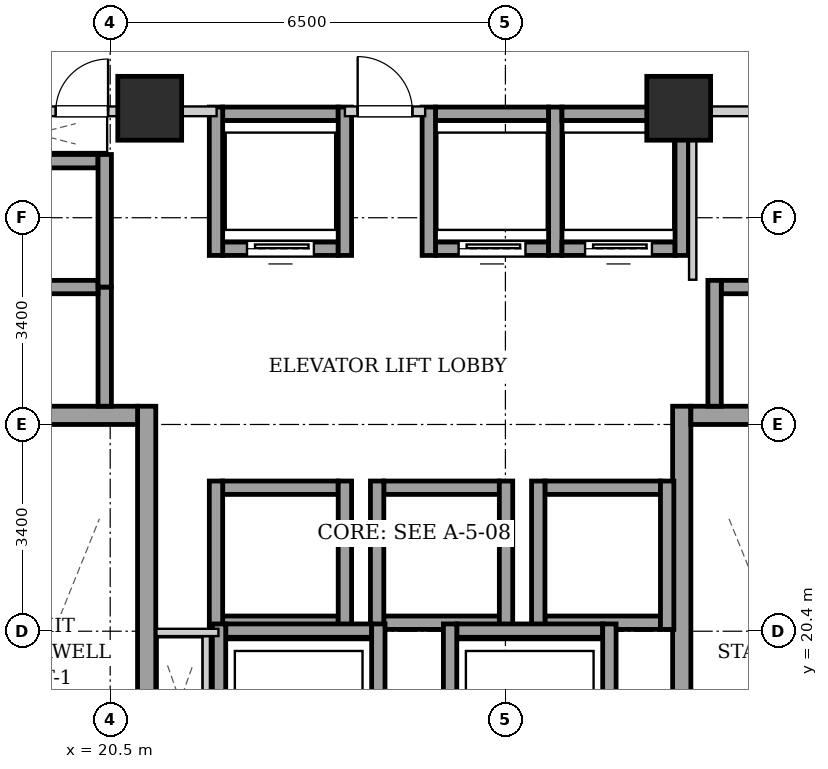
"""IFC4 building model, lengths in metres.
Left out: names, types, materials, properties, quantities, classifications, styles, units other than length and angle.
Written with IfcOpenShell. Run it as: python <this file> out.ifc"""

import sys

from ifc_helpers import new_model, si_unit, direction, frame, frame_2d, origin, origin_2d, place, context, subcontext, project, spatial, rectangle, extrude, element, fill, save


model = new_model("IFC4")
c1 = context("Model", 3, precision=1e-05, world=origin(), true_north=direction((0.0, 1.0)))
c2 = subcontext(c1, "Body", "Model", "MODEL_VIEW")
j1 = project(units=[si_unit("LENGTHUNIT", "METRE"), si_unit("PLANEANGLEUNIT", "RADIAN")], contexts=[c1])
p1 = place(None, origin())
s1 = spatial("IfcSite", under=j1, at=p1, CompositionType="ELEMENT")
p2 = place(p1, origin())
s2 = spatial("IfcBuilding", under=s1, at=p2, CompositionType="ELEMENT")
p3 = place(p2, frame((0.0, 0.0, 84.7)))
s3 = spatial("IfcBuildingStorey", under=s2, at=p3, CompositionType="ELEMENT", Elevation=84.7)
for number, where, z_axis, x_axis in (
    (1, (21.15, 29.0, 0.0), (0.0, 0.0, 1.0), (1.0, 0.0, 0.0)),
    (2, (29.85, 29.0, 0.0), (0.0, 0.0, 1.0), (1.0, 0.0, 0.0)),
):
    element("IfcColumn", number, at=place(p3, frame(where, z_axis=z_axis, x_axis=x_axis)), inside=s3, PredefinedType="COLUMN", context=c2, shape_type="SweptSolid", body=[
        extrude(rectangle(XDim=1.05, YDim=1.05, at=origin_2d()), origin(), (0.0, 0.0, 1.0), 3.2),
    ])
p4 = place(p3, frame((21.1, 15.1, 0.0), z_axis=(0.0, 0.0, 1.0), x_axis=(0.0, 1.0, 0.0)))
e3 = element("IfcWall", 3, at=p4, inside=s3, PredefinedType="SHEAR", context=c2, shape_type="SweptSolid", body=[
    extrude(rectangle(XDim=9.0, YDim=0.3, at=frame_2d((4.5, 0.0))), origin(), (0.0, 0.0, 1.0), 2.94),
])
p5 = place(p3, frame((18.1, 23.95, 0.0), z_axis=(0.0, 0.0, 1.0), x_axis=(1.0, 0.0, 0.0)))
e4 = element("IfcWall", 4, at=p5, inside=s3, PredefinedType="SHEAR", context=c2, shape_type="SweptSolid", body=[
    extrude(rectangle(XDim=2.85, YDim=0.3, at=frame_2d((1.425, 0.0))), origin(), (0.0, 0.0, 1.0), 2.94),
])
p6 = place(p3, frame((29.9, 15.1, 0.0), z_axis=(0.0, 0.0, 1.0), x_axis=(0.0, 1.0, 0.0)))
e5 = element("IfcWall", 5, at=p6, inside=s3, PredefinedType="SHEAR", context=c2, shape_type="SweptSolid", body=[
    extrude(rectangle(XDim=9.0, YDim=0.3, at=frame_2d((4.5, 0.0))), origin(), (0.0, 0.0, 1.0), 2.94),
])
p7 = place(p3, frame((30.05, 23.95, 0.0), z_axis=(0.0, 0.0, 1.0), x_axis=(1.0, 0.0, 0.0)))
e6 = element("IfcWall", 6, at=p7, inside=s3, PredefinedType="SHEAR", context=c2, shape_type="SweptSolid", body=[
    extrude(rectangle(XDim=2.85, YDim=0.3, at=frame_2d((1.425, 0.0))), origin(), (0.0, 0.0, 1.0), 2.94),
])
p8 = place(p3, frame((22.35, 26.69, 0.0), z_axis=(0.0, 0.0, 1.0), x_axis=(1.0, 0.0, 0.0)))
e7 = element("IfcWall", 7, at=p8, inside=s3, PredefinedType="SHEAR", context=c2, shape_type="SweptSolid", body=[
    extrude(rectangle(XDim=1.9, YDim=0.22, at=frame_2d((0.95, 0.0))), origin(), (0.0, 0.0, 1.0), 2.94),
])
p9 = place(p8, frame((0.4, 0.0, 0.0)))
e8 = element("IfcOpeningElement", 8, at=p9, cuts=e7, PredefinedType="OPENING", context=c2, shape_type="SweptSolid", body=[
    extrude(rectangle(XDim=1.1, YDim=2.15, at=frame_2d((0.55, 1.075))), frame((0.0, 0.12, 0.0), z_axis=(0.0, -1.0, 0.0), x_axis=(1.0, 0.0, 0.0)), (0.0, 0.0, 1.0), 0.24),
])
p10 = place(p3, frame((22.35, 28.91, 0.0), z_axis=(0.0, 0.0, 1.0), x_axis=(1.0, 0.0, 0.0)))
e9 = element("IfcWall", 9, at=p10, inside=s3, PredefinedType="SHEAR", context=c2, shape_type="SweptSolid", body=[
    extrude(rectangle(XDim=1.9, YDim=0.22, at=frame_2d((0.95, 0.0))), origin(), (0.0, 0.0, 1.0), 2.94),
])
for number, where, z_axis, x_axis in (
    (10, (22.24, 26.58, 0.0), (0.0, 0.0, 1.0), (0.0, 1.0, 0.0)),
    (11, (24.36, 26.58, 0.0), (0.0, 0.0, 1.0), (0.0, 1.0, 0.0)),
):
    element("IfcWall", number, at=place(p3, frame(where, z_axis=z_axis, x_axis=x_axis)), inside=s3, PredefinedType="SHEAR", context=c2, shape_type="SweptSolid", body=[
        extrude(rectangle(XDim=2.44, YDim=0.22, at=frame_2d((1.22, 0.0))), origin(), (0.0, 0.0, 1.0), 2.94),
    ])
p11 = place(p3, frame((25.85, 26.69, 0.0), z_axis=(0.0, 0.0, 1.0), x_axis=(1.0, 0.0, 0.0)))
e12 = element("IfcWall", 12, at=p11, inside=s3, PredefinedType="SHEAR", context=c2, shape_type="SweptSolid", body=[
    extrude(rectangle(XDim=1.86, YDim=0.22, at=frame_2d((0.93, 0.0))), origin(), (0.0, 0.0, 1.0), 2.94),
])
p12 = place(p11, frame((0.38, 0.0, 0.0)))
e13 = element("IfcOpeningElement", 13, at=p12, cuts=e12, PredefinedType="OPENING", context=c2, shape_type="SweptSolid", body=[
    extrude(rectangle(XDim=1.1, YDim=2.15, at=frame_2d((0.55, 1.075))), frame((0.0, 0.12, 0.0), z_axis=(0.0, -1.0, 0.0), x_axis=(1.0, 0.0, 0.0)), (0.0, 0.0, 1.0), 0.24),
])
p13 = place(p3, frame((25.85, 28.91, 0.0), z_axis=(0.0, 0.0, 1.0), x_axis=(1.0, 0.0, 0.0)))
e14 = element("IfcWall", 14, at=p13, inside=s3, PredefinedType="SHEAR", context=c2, shape_type="SweptSolid", body=[
    extrude(rectangle(XDim=1.86, YDim=0.22, at=frame_2d((0.93, 0.0))), origin(), (0.0, 0.0, 1.0), 2.94),
])
for number, where, z_axis, x_axis in (
    (15, (25.74, 26.58, 0.0), (0.0, 0.0, 1.0), (0.0, 1.0, 0.0)),
    (16, (27.82, 26.58, 0.0), (0.0, 0.0, 1.0), (0.0, 1.0, 0.0)),
):
    element("IfcWall", number, at=place(p3, frame(where, z_axis=z_axis, x_axis=x_axis)), inside=s3, PredefinedType="SHEAR", context=c2, shape_type="SweptSolid", body=[
        extrude(rectangle(XDim=2.44, YDim=0.22, at=frame_2d((1.22, 0.0))), origin(), (0.0, 0.0, 1.0), 2.94),
    ])
p14 = place(p3, frame((27.93, 26.69, 0.0), z_axis=(0.0, 0.0, 1.0), x_axis=(1.0, 0.0, 0.0)))
e17 = element("IfcWall", 17, at=p14, inside=s3, PredefinedType="SHEAR", context=c2, shape_type="SweptSolid", body=[
    extrude(rectangle(XDim=1.86, YDim=0.22, at=frame_2d((0.93, 0.0))), origin(), (0.0, 0.0, 1.0), 2.94),
])
p15 = place(p14, frame((0.38, 0.0, 0.0)))
e18 = element("IfcOpeningElement", 18, at=p15, cuts=e17, PredefinedType="OPENING", context=c2, shape_type="SweptSolid", body=[
    extrude(rectangle(XDim=1.1, YDim=2.15, at=frame_2d((0.55, 1.075))), frame((0.0, 0.12, 0.0), z_axis=(0.0, -1.0, 0.0), x_axis=(1.0, 0.0, 0.0)), (0.0, 0.0, 1.0), 0.24),
])
p16 = place(p3, frame((27.93, 28.91, 0.0), z_axis=(0.0, 0.0, 1.0), x_axis=(1.0, 0.0, 0.0)))
e19 = element("IfcWall", 19, at=p16, inside=s3, PredefinedType="SHEAR", context=c2, shape_type="SweptSolid", body=[
    extrude(rectangle(XDim=1.86, YDim=0.22, at=frame_2d((0.93, 0.0))), origin(), (0.0, 0.0, 1.0), 2.94),
])
p17 = place(p3, frame((29.9, 26.58, 0.0), z_axis=(0.0, 0.0, 1.0), x_axis=(0.0, 1.0, 0.0)))
e20 = element("IfcWall", 20, at=p17, inside=s3, PredefinedType="SHEAR", context=c2, shape_type="SweptSolid", body=[
    extrude(rectangle(XDim=2.44, YDim=0.22, at=frame_2d((1.22, 0.0))), origin(), (0.0, 0.0, 1.0), 2.94),
])
for number, where, z_axis, x_axis in (
    (21, (22.35, 20.54, 0.0), (0.0, 0.0, 1.0), (1.0, 0.0, 0.0)),
    (22, (22.35, 22.76, 0.0), (0.0, 0.0, 1.0), (1.0, 0.0, 0.0)),
):
    element("IfcWall", number, at=place(p3, frame(where, z_axis=z_axis, x_axis=x_axis)), inside=s3, PredefinedType="SHEAR", context=c2, shape_type="SweptSolid", body=[
        extrude(rectangle(XDim=1.9, YDim=0.22, at=frame_2d((0.95, 0.0))), origin(), (0.0, 0.0, 1.0), 2.94),
    ])
for number, where, z_axis, x_axis in (
    (23, (22.24, 20.43, 0.0), (0.0, 0.0, 1.0), (0.0, 1.0, 0.0)),
    (24, (24.36, 20.43, 0.0), (0.0, 0.0, 1.0), (0.0, 1.0, 0.0)),
):
    element("IfcWall", number, at=place(p3, frame(where, z_axis=z_axis, x_axis=x_axis)), inside=s3, PredefinedType="SHEAR", context=c2, shape_type="SweptSolid", body=[
        extrude(rectangle(XDim=2.44, YDim=0.22, at=frame_2d((1.22, 0.0))), origin(), (0.0, 0.0, 1.0), 2.94),
    ])
for number, where, z_axis, x_axis in (
    (25, (25.0, 20.54, 0.0), (0.0, 0.0, 1.0), (1.0, 0.0, 0.0)),
    (26, (25.0, 22.76, 0.0), (0.0, 0.0, 1.0), (1.0, 0.0, 0.0)),
):
    element("IfcWall", number, at=place(p3, frame(where, z_axis=z_axis, x_axis=x_axis)), inside=s3, PredefinedType="SHEAR", context=c2, shape_type="SweptSolid", body=[
        extrude(rectangle(XDim=1.9, YDim=0.22, at=frame_2d((0.95, 0.0))), origin(), (0.0, 0.0, 1.0), 2.94),
    ])
for number, where, z_axis, x_axis in (
    (27, (24.89, 20.43, 0.0), (0.0, 0.0, 1.0), (0.0, 1.0, 0.0)),
    (28, (27.01, 20.43, 0.0), (0.0, 0.0, 1.0), (0.0, 1.0, 0.0)),
):
    element("IfcWall", number, at=place(p3, frame(where, z_axis=z_axis, x_axis=x_axis)), inside=s3, PredefinedType="SHEAR", context=c2, shape_type="SweptSolid", body=[
        extrude(rectangle(XDim=2.44, YDim=0.22, at=frame_2d((1.22, 0.0))), origin(), (0.0, 0.0, 1.0), 2.94),
    ])
for number, where, z_axis, x_axis in (
    (29, (27.65, 20.54, 0.0), (0.0, 0.0, 1.0), (1.0, 0.0, 0.0)),
    (30, (27.65, 22.76, 0.0), (0.0, 0.0, 1.0), (1.0, 0.0, 0.0)),
):
    element("IfcWall", number, at=place(p3, frame(where, z_axis=z_axis, x_axis=x_axis)), inside=s3, PredefinedType="SHEAR", context=c2, shape_type="SweptSolid", body=[
        extrude(rectangle(XDim=1.9, YDim=0.22, at=frame_2d((0.95, 0.0))), origin(), (0.0, 0.0, 1.0), 2.94),
    ])
for number, where, z_axis, x_axis in (
    (31, (27.54, 20.43, 0.0), (0.0, 0.0, 1.0), (0.0, 1.0, 0.0)),
    (32, (29.66, 20.43, 0.0), (0.0, 0.0, 1.0), (0.0, 1.0, 0.0)),
):
    element("IfcWall", number, at=place(p3, frame(where, z_axis=z_axis, x_axis=x_axis)), inside=s3, PredefinedType="SHEAR", context=c2, shape_type="SweptSolid", body=[
        extrude(rectangle(XDim=2.44, YDim=0.22, at=frame_2d((1.22, 0.0))), origin(), (0.0, 0.0, 1.0), 2.94),
    ])
p18 = place(p3, frame((20.41, 24.1, 0.0), z_axis=(0.0, 0.0, 1.0), x_axis=(0.0, 1.0, 0.0)))
e33 = element("IfcWall", 33, at=p18, inside=s3, PredefinedType="SHEAR", context=c2, shape_type="SweptSolid", body=[
    extrude(rectangle(XDim=1.96, YDim=0.22, at=frame_2d((0.98, 0.0))), origin(), (0.0, 0.0, 1.0), 2.94),
])
for number, where, z_axis, x_axis in (
    (34, (18.4, 26.06, 0.0), (0.0, 0.0, 1.0), (1.0, 0.0, 0.0)),
    (35, (18.4, 28.13, 0.0), (0.0, 0.0, 1.0), (1.0, 0.0, 0.0)),
):
    element("IfcWall", number, at=place(p3, frame(where, z_axis=z_axis, x_axis=x_axis)), inside=s3, PredefinedType="SHEAR", context=c2, shape_type="SweptSolid", body=[
        extrude(rectangle(XDim=1.9, YDim=0.22, at=frame_2d((0.95, 0.0))), origin(), (0.0, 0.0, 1.0), 2.94),
    ])
p19 = place(p3, frame((20.41, 26.06, 0.0), z_axis=(0.0, 0.0, 1.0), x_axis=(0.0, 1.0, 0.0)))
e36 = element("IfcWall", 36, at=p19, inside=s3, PredefinedType="SHEAR", context=c2, shape_type="SweptSolid", body=[
    extrude(rectangle(XDim=2.18, YDim=0.22, at=frame_2d((1.09, 0.0))), origin(), (0.0, 0.0, 1.0), 2.94),
])
p20 = place(p3, frame((30.55, 26.06, 0.0), z_axis=(0.0, 0.0, 1.0), x_axis=(1.0, 0.0, 0.0)))
e37 = element("IfcWall", 37, at=p20, inside=s3, PredefinedType="SHEAR", context=c2, shape_type="SweptSolid", body=[
    extrude(rectangle(XDim=1.9, YDim=0.22, at=frame_2d((0.95, 0.0))), origin(), (0.0, 0.0, 1.0), 2.94),
])
p21 = place(p3, frame((30.44, 24.1, 0.0), z_axis=(0.0, 0.0, 1.0), x_axis=(0.0, 1.0, 0.0)))
e38 = element("IfcWall", 38, at=p21, inside=s3, PredefinedType="SHEAR", context=c2, shape_type="SweptSolid", body=[
    extrude(rectangle(XDim=2.07, YDim=0.22, at=frame_2d((1.035, 0.0))), origin(), (0.0, 0.0, 1.0), 2.94),
])
p22 = place(p3, frame((22.4, 20.41, 0.0), z_axis=(0.0, 0.0, 1.0), x_axis=(1.0, 0.0, 0.0)))
e39 = element("IfcWall", 39, at=p22, inside=s3, PredefinedType="SHEAR", context=c2, shape_type="SweptSolid", body=[
    extrude(rectangle(XDim=2.4, YDim=0.22, at=frame_2d((1.2, 0.0))), origin(), (0.0, 0.0, 1.0), 2.94),
])
for number, where, z_axis, x_axis in (
    (40, (22.29, 17.98, 0.0), (0.0, 0.0, 1.0), (0.0, 1.0, 0.0)),
    (41, (24.91, 17.98, 0.0), (0.0, 0.0, 1.0), (0.0, 1.0, 0.0)),
):
    element("IfcWall", number, at=place(p3, frame(where, z_axis=z_axis, x_axis=x_axis)), inside=s3, PredefinedType="SHEAR", context=c2, shape_type="SweptSolid", body=[
        extrude(rectangle(XDim=2.54, YDim=0.22, at=frame_2d((1.27, 0.0))), origin(), (0.0, 0.0, 1.0), 2.94),
    ])
p23 = place(p3, frame((26.2, 20.41, 0.0), z_axis=(0.0, 0.0, 1.0), x_axis=(1.0, 0.0, 0.0)))
e42 = element("IfcWall", 42, at=p23, inside=s3, PredefinedType="SHEAR", context=c2, shape_type="SweptSolid", body=[
    extrude(rectangle(XDim=2.4, YDim=0.22, at=frame_2d((1.2, 0.0))), origin(), (0.0, 0.0, 1.0), 2.94),
])
for number, where, z_axis, x_axis in (
    (43, (26.09, 17.98, 0.0), (0.0, 0.0, 1.0), (0.0, 1.0, 0.0)),
    (44, (28.71, 17.98, 0.0), (0.0, 0.0, 1.0), (0.0, 1.0, 0.0)),
):
    element("IfcWall", number, at=place(p3, frame(where, z_axis=z_axis, x_axis=x_axis)), inside=s3, PredefinedType="SHEAR", context=c2, shape_type="SweptSolid", body=[
        extrude(rectangle(XDim=2.54, YDim=0.22, at=frame_2d((1.27, 0.0))), origin(), (0.0, 0.0, 1.0), 2.94),
    ])
p24 = place(p3, frame((24.36, 28.95, 0.0), z_axis=(0.0, 0.0, 1.0), x_axis=(1.0, 0.0, 0.0)))
e45 = element("IfcWall", 45, at=p24, inside=s3, PredefinedType="PARTITIONING", context=c2, shape_type="SweptSolid", body=[
    extrude(rectangle(XDim=1.32, YDim=0.16, at=frame_2d((0.66, 0.0))), origin(), (0.0, 0.0, 1.0), 2.309),
])
p25 = place(p24, frame((0.21, 0.0, 0.0)))
e46 = element("IfcOpeningElement", 46, at=p25, cuts=e45, PredefinedType="OPENING", context=c2, shape_type="SweptSolid", body=[
    extrude(rectangle(XDim=0.9, YDim=2.05, at=frame_2d((0.45, 1.025))), frame((0.0, 0.09, 0.0), z_axis=(0.0, -1.0, 0.0), x_axis=(1.0, 0.0, 0.0)), (0.0, 0.0, 1.0), 0.18),
])
p26 = place(p3, frame((17.96, 28.95, 0.0), z_axis=(0.0, 0.0, 1.0), x_axis=(1.0, 0.0, 0.0)))
e47 = element("IfcWall", 47, at=p26, inside=s3, PredefinedType="PARTITIONING", context=c2, shape_type="SweptSolid", body=[
    extrude(rectangle(XDim=4.29, YDim=0.16, at=frame_2d((2.145, 0.0))), origin(), (0.0, 0.0, 1.0), 2.309),
])
p27 = place(p26, frame((1.645, 0.0, 0.0)))
e48 = element("IfcOpeningElement", 48, at=p27, cuts=e47, PredefinedType="OPENING", context=c2, shape_type="SweptSolid", body=[
    extrude(rectangle(XDim=0.86, YDim=2.05, at=frame_2d((0.43, 1.025))), frame((0.0, 0.09, 0.0), z_axis=(0.0, -1.0, 0.0), x_axis=(1.0, 0.0, 0.0)), (0.0, 0.0, 1.0), 0.18),
])
p28 = place(p3, frame((22.08, 18.2, 0.0), z_axis=(0.0, 0.0, 1.0), x_axis=(0.0, 1.0, 0.0)))
e49 = element("IfcWall", 49, at=p28, inside=s3, PredefinedType="PARTITIONING", context=c2, shape_type="SweptSolid", body=[
    extrude(rectangle(XDim=2.12, YDim=0.12, at=frame_2d((1.06, 0.0))), origin(), (0.0, 0.0, 1.0), 2.94),
])
p29 = place(p3, frame((22.28, 20.38, 0.0), z_axis=(0.0, 0.0, 1.0), x_axis=(-1.0, 0.0, 0.0)))
e50 = element("IfcWall", 50, at=p29, inside=s3, PredefinedType="PARTITIONING", context=c2, shape_type="SweptSolid", body=[
    extrude(rectangle(XDim=1.02, YDim=0.12, at=frame_2d((0.51, 0.0))), origin(), (0.0, 0.0, 1.0), 2.94),
])
p30 = place(p3, frame((30.08, 26.18, 0.0), z_axis=(0.0, 0.0, 1.0), x_axis=(0.0, 1.0, 0.0)))
e51 = element("IfcWall", 51, at=p30, inside=s3, PredefinedType="PARTITIONING", context=c2, shape_type="SweptSolid", body=[
    extrude(rectangle(XDim=2.68, YDim=0.12, at=frame_2d((1.34, 0.0))), origin(), (0.0, 0.0, 1.0), 2.94),
])
p31 = place(p3, frame((30.08, 28.95, 0.0), z_axis=(0.0, 0.0, 1.0), x_axis=(1.0, 0.0, 0.0)))
e52 = element("IfcWall", 52, at=p31, inside=s3, PredefinedType="PARTITIONING", context=c2, shape_type="SweptSolid", body=[
    extrude(rectangle(XDim=2.96, YDim=0.16, at=frame_2d((1.48, 0.0))), origin(), (0.0, 0.0, 1.0), 2.94),
])
p32 = place(p31, frame((1.045, 0.0, 0.0)))
e53 = element("IfcOpeningElement", 53, at=p32, cuts=e52, PredefinedType="OPENING", context=c2, shape_type="SweptSolid", body=[
    extrude(rectangle(XDim=0.86, YDim=2.05, at=frame_2d((0.43, 1.025))), frame((0.0, 0.09, 0.0), z_axis=(0.0, -1.0, 0.0), x_axis=(1.0, 0.0, 0.0)), (0.0, 0.0, 1.0), 0.18),
])
p33 = place(p9, origin())
e54 = element("IfcDoor", 54, at=p33, inside=s3, OperationType="SLIDING_TO_LEFT", PredefinedType="DOOR", context=c2, shape_type="SweptSolid", body=[
    extrude(rectangle(XDim=1.1, YDim=2.15, at=frame_2d((0.55, 1.075))), frame((0.0, 0.025, 0.0), z_axis=(0.0, -1.0, 0.0), x_axis=(1.0, 0.0, 0.0)), (0.0, 0.0, 1.0), 0.05),
])
fill(e8, e54)
p34 = place(p12, origin())
e55 = element("IfcDoor", 55, at=p34, inside=s3, OperationType="SLIDING_TO_LEFT", PredefinedType="DOOR", context=c2, shape_type="SweptSolid", body=[
    extrude(rectangle(XDim=1.1, YDim=2.15, at=frame_2d((0.55, 1.075))), frame((0.0, 0.025, 0.0), z_axis=(0.0, -1.0, 0.0), x_axis=(1.0, 0.0, 0.0)), (0.0, 0.0, 1.0), 0.05),
])
fill(e13, e55)
p35 = place(p15, origin())
e56 = element("IfcDoor", 56, at=p35, inside=s3, OperationType="SLIDING_TO_LEFT", PredefinedType="DOOR", context=c2, shape_type="SweptSolid", body=[
    extrude(rectangle(XDim=1.1, YDim=2.15, at=frame_2d((0.55, 1.075))), frame((0.0, 0.025, 0.0), z_axis=(0.0, -1.0, 0.0), x_axis=(1.0, 0.0, 0.0)), (0.0, 0.0, 1.0), 0.05),
])
fill(e18, e56)
p36 = place(p25, origin())
e57 = element("IfcDoor", 57, at=p36, inside=s3, OperationType="SINGLE_SWING_LEFT", PredefinedType="DOOR", context=c2, shape_type="SweptSolid", body=[
    extrude(rectangle(XDim=0.9, YDim=2.05, at=frame_2d((0.45, 1.025))), frame((0.0, 0.025, 0.0), z_axis=(0.0, -1.0, 0.0), x_axis=(1.0, 0.0, 0.0)), (0.0, 0.0, 1.0), 0.05),
])
fill(e46, e57)
p37 = place(p27, origin())
e58 = element("IfcDoor", 58, at=p37, inside=s3, OperationType="SINGLE_SWING_RIGHT", PredefinedType="DOOR", context=c2, shape_type="SweptSolid", body=[
    extrude(rectangle(XDim=0.86, YDim=2.05, at=frame_2d((0.43, 1.025))), frame((0.0, 0.025, 0.0), z_axis=(0.0, -1.0, 0.0), x_axis=(1.0, 0.0, 0.0)), (0.0, 0.0, 1.0), 0.05),
])
fill(e48, e58)
save(model, sys.argv[1])
